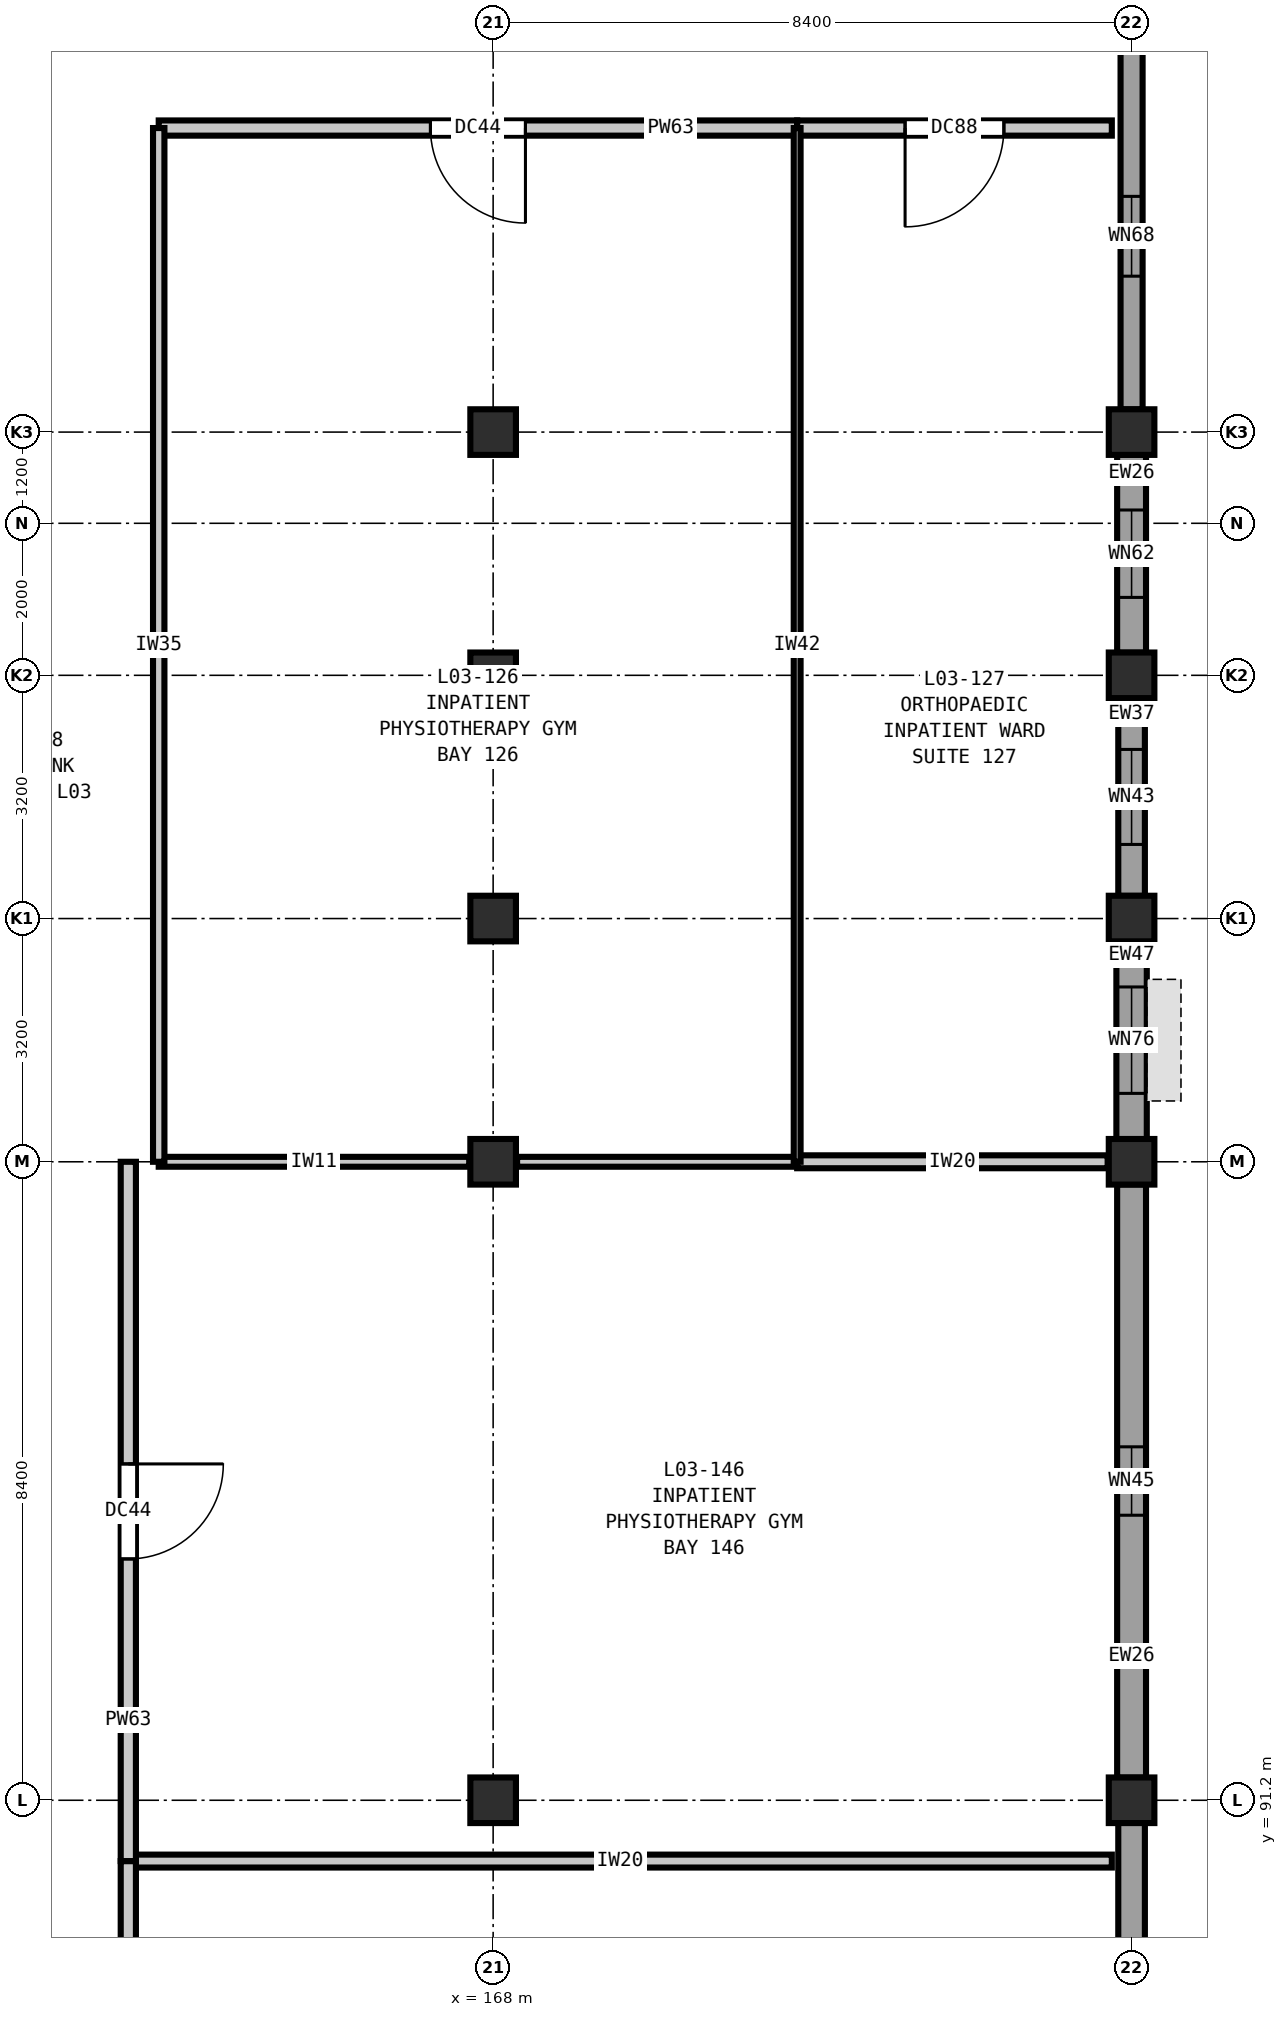
"""IFC4 building model, lengths in metres.
Left out: names, types, materials, properties, quantities, classifications, styles, units other than length and angle.
Written with IfcOpenShell. Run it as: python <this file> out.ifc"""

import sys

from ifc_helpers import new_model, si_unit, direction, frame, frame_2d, origin, origin_2d, place, context, subcontext, project, spatial, rectangle, extrude, element, fill, save


model = new_model("IFC4")
c1 = context("Model", 3, precision=1e-05, world=origin(), true_north=direction((0.0, 1.0)))
c2 = subcontext(c1, "Body", "Model", "MODEL_VIEW")
j1 = project(units=[si_unit("LENGTHUNIT", "METRE"), si_unit("PLANEANGLEUNIT", "RADIAN")], contexts=[c1])
p1 = place(None, origin())
s1 = spatial("IfcSite", under=j1, at=p1, CompositionType="ELEMENT")
p2 = place(p1, origin())
s2 = spatial("IfcBuilding", under=s1, at=p2, CompositionType="ELEMENT")
p3 = place(p2, frame((0.0, 0.0, 16.2)))
s3 = spatial("IfcBuildingStorey", under=s2, at=p3, CompositionType="ELEMENT", Elevation=16.2)
for number, where, z_axis, x_axis in (
    (1, (168.0, 91.2, 0.0), (0.0, 0.0, 1.0), (1.0, 0.0, 0.0)),
    (2, (168.0, 99.6, 0.0), (0.0, 0.0, 1.0), (1.0, 0.0, 0.0)),
    (3, (168.0, 102.8, 0.0), (0.0, 0.0, 1.0), (1.0, 0.0, 0.0)),
    (4, (168.0, 106.0, 0.0), (0.0, 0.0, 1.0), (1.0, 0.0, 0.0)),
    (5, (168.0, 109.2, 0.0), (0.0, 0.0, 1.0), (1.0, 0.0, 0.0)),
    (6, (176.4, 91.2, 0.0), (0.0, 0.0, 1.0), (1.0, 0.0, 0.0)),
    (7, (176.4, 99.6, 0.0), (0.0, 0.0, 1.0), (1.0, 0.0, 0.0)),
    (8, (176.4, 102.8, 0.0), (0.0, 0.0, 1.0), (1.0, 0.0, 0.0)),
    (9, (176.4, 106.0, 0.0), (0.0, 0.0, 1.0), (1.0, 0.0, 0.0)),
    (10, (176.4, 109.2, 0.0), (0.0, 0.0, 1.0), (1.0, 0.0, 0.0)),
):
    element("IfcColumn", number, at=place(p3, frame(where, z_axis=z_axis, x_axis=x_axis)), inside=s3, PredefinedType="COLUMN", context=c2, shape_type="SweptSolid", body=[
        extrude(rectangle(XDim=0.6, YDim=0.6, at=origin_2d()), origin(), (0.0, 0.0, 1.0), 4.2),
    ])
p4 = place(p3, frame((176.4, 116.102, 0.0), z_axis=(0.0, 0.0, 1.0), x_axis=(0.0, -1.0, 0.0)))
e11 = element("IfcWall", 11, at=p4, inside=s3, PredefinedType="SOLIDWALL", context=c2, shape_type="SweptSolid", body=[
    extrude(rectangle(XDim=6.604, YDim=0.29, at=frame_2d((3.302, 0.0))), origin(), (0.0, 0.0, 1.0), 3.48),
])
p5 = place(p4, frame((3.801, 0.0, 0.9)))
e12 = element("IfcOpeningElement", 12, at=p5, cuts=e11, PredefinedType="OPENING", context=c2, shape_type="SweptSolid", body=[
    extrude(rectangle(XDim=1.05, YDim=1.4, at=frame_2d((0.525, 0.7))), frame((0.0, 0.155, 0.0), z_axis=(0.0, -1.0, 0.0), x_axis=(1.0, 0.0, 0.0)), (0.0, 0.0, 1.0), 0.31),
])
p6 = place(p3, frame((176.4, 108.902, 0.0), z_axis=(0.0, 0.0, 1.0), x_axis=(0.0, -1.0, 0.0)))
e13 = element("IfcWall", 13, at=p6, inside=s3, PredefinedType="SOLIDWALL", context=c2, shape_type="SweptSolid", body=[
    extrude(rectangle(XDim=2.604, YDim=0.38, at=frame_2d((1.302, 0.0))), origin(), (0.0, 0.0, 1.0), 3.48),
])
p7 = place(p6, frame((0.727, 0.0, 0.9)))
e14 = element("IfcOpeningElement", 14, at=p7, cuts=e13, PredefinedType="OPENING", context=c2, shape_type="SweptSolid", body=[
    extrude(rectangle(XDim=1.15, YDim=1.4, at=frame_2d((0.575, 0.7))), frame((0.0, 0.2, 0.0), z_axis=(0.0, -1.0, 0.0), x_axis=(1.0, 0.0, 0.0)), (0.0, 0.0, 1.0), 0.4),
])
p8 = place(p3, frame((176.4, 105.702, 0.0), z_axis=(0.0, 0.0, 1.0), x_axis=(0.0, -1.0, 0.0)))
e15 = element("IfcWall", 15, at=p8, inside=s3, PredefinedType="SOLIDWALL", context=c2, shape_type="SweptSolid", body=[
    extrude(rectangle(XDim=2.604, YDim=0.35, at=frame_2d((1.302, 0.0))), origin(), (0.0, 0.0, 1.0), 3.48),
])
p9 = place(p8, frame((0.677, 0.0, 0.9)))
e16 = element("IfcOpeningElement", 16, at=p9, cuts=e15, PredefinedType="OPENING", context=c2, shape_type="SweptSolid", body=[
    extrude(rectangle(XDim=1.25, YDim=1.4, at=frame_2d((0.625, 0.7))), frame((0.0, 0.185, 0.0), z_axis=(0.0, -1.0, 0.0), x_axis=(1.0, 0.0, 0.0)), (0.0, 0.0, 1.0), 0.37),
])
p10 = place(p3, frame((176.4, 102.502, 0.0), z_axis=(0.0, 0.0, 1.0), x_axis=(0.0, -1.0, 0.0)))
e17 = element("IfcWall", 17, at=p10, inside=s3, PredefinedType="SOLIDWALL", context=c2, shape_type="SweptSolid", body=[
    extrude(rectangle(XDim=2.604, YDim=0.4, at=frame_2d((1.302, 0.0))), origin(), (0.0, 0.0, 1.0), 3.48),
])
p11 = place(p10, frame((0.602, 0.0, 0.9)))
e18 = element("IfcOpeningElement", 18, at=p11, cuts=e17, PredefinedType="OPENING", context=c2, shape_type="SweptSolid", body=[
    extrude(rectangle(XDim=1.4, YDim=1.4, at=frame_2d((0.7, 0.7))), frame((0.0, 0.21, 0.0), z_axis=(0.0, -1.0, 0.0), x_axis=(1.0, 0.0, 0.0)), (0.0, 0.0, 1.0), 0.42),
])
p12 = place(p3, frame((176.4, 99.302, 0.0), z_axis=(0.0, 0.0, 1.0), x_axis=(0.0, -1.0, 0.0)))
e19 = element("IfcWall", 19, at=p12, inside=s3, PredefinedType="SOLIDWALL", context=c2, shape_type="SweptSolid", body=[
    extrude(rectangle(XDim=7.804, YDim=0.38, at=frame_2d((3.902, 0.0))), origin(), (0.0, 0.0, 1.0), 3.48),
])
p13 = place(p12, frame((3.452, 0.0, 0.9)))
e20 = element("IfcOpeningElement", 20, at=p13, cuts=e19, PredefinedType="OPENING", context=c2, shape_type="SweptSolid", body=[
    extrude(rectangle(XDim=0.9, YDim=1.55, at=frame_2d((0.45, 0.775))), frame((0.0, 0.2, 0.0), z_axis=(0.0, -1.0, 0.0), x_axis=(1.0, 0.0, 0.0)), (0.0, 0.0, 1.0), 0.4),
])
p14 = place(p3, frame((176.4, 90.902, 0.0), z_axis=(0.0, 0.0, 1.0), x_axis=(0.0, -1.0, 0.0)))
e21 = element("IfcWall", 21, at=p14, inside=s3, PredefinedType="SOLIDWALL", context=c2, shape_type="SweptSolid", body=[
    extrude(rectangle(XDim=7.829, YDim=0.35, at=frame_2d((3.915, 0.0))), origin(), (0.0, 0.0, 1.0), 3.48),
])
p15 = place(p14, frame((3.415, 0.0, 0.9)))
e22 = element("IfcOpeningElement", 22, at=p15, cuts=e21, PredefinedType="OPENING", context=c2, shape_type="SweptSolid", body=[
    extrude(rectangle(XDim=1.0, YDim=1.55, at=frame_2d((0.5, 0.775))), frame((0.0, 0.185, 0.0), z_axis=(0.0, -1.0, 0.0), x_axis=(1.0, 0.0, 0.0)), (0.0, 0.0, 1.0), 0.37),
])
p16 = place(p3, frame((163.2, 90.4, 0.0), z_axis=(0.0, 0.0, 1.0), x_axis=(1.0, 0.0, 0.0)))
e23 = element("IfcWall", 23, at=p16, inside=s3, PredefinedType="PARTITIONING", context=c2, shape_type="SweptSolid", body=[
    extrude(rectangle(XDim=12.94, YDim=0.17, at=frame_2d((6.47, 0.0))), origin(), (0.0, 0.0, 1.0), 3.89),
])
p17 = place(p3, frame((163.6, 99.6, 0.0), z_axis=(0.0, 0.0, 1.0), x_axis=(1.0, 0.0, 0.0)))
e24 = element("IfcWall", 24, at=p17, inside=s3, PredefinedType="PARTITIONING", context=c2, shape_type="SweptSolid", body=[
    extrude(rectangle(XDim=4.085, YDim=0.13, at=frame_2d((2.042, 0.0))), origin(), (0.0, 0.0, 1.0), 3.535),
])
p18 = place(p3, frame((168.315, 99.6, 0.0), z_axis=(0.0, 0.0, 1.0), x_axis=(1.0, 0.0, 0.0)))
e25 = element("IfcWall", 25, at=p18, inside=s3, PredefinedType="PARTITIONING", context=c2, shape_type="SweptSolid", body=[
    extrude(rectangle(XDim=3.685, YDim=0.13, at=frame_2d((1.843, 0.0))), origin(), (0.0, 0.0, 1.0), 3.535),
])
p19 = place(p3, frame((172.0, 99.6, 0.0), z_axis=(0.0, 0.0, 1.0), x_axis=(1.0, 0.0, 0.0)))
e26 = element("IfcWall", 26, at=p19, inside=s3, PredefinedType="PARTITIONING", context=c2, shape_type="SweptSolid", body=[
    extrude(rectangle(XDim=4.085, YDim=0.17, at=frame_2d((2.042, 0.0))), origin(), (0.0, 0.0, 1.0), 3.535),
])
p20 = place(p3, frame((163.6, 113.2, 0.0), z_axis=(0.0, 0.0, 1.0), x_axis=(1.0, 0.0, 0.0)))
e27 = element("IfcWall", 27, at=p20, inside=s3, PredefinedType="PARTITIONING", context=c2, shape_type="SweptSolid", body=[
    extrude(rectangle(XDim=8.4, YDim=0.2, at=frame_2d((4.2, 0.0))), origin(), (0.0, 0.0, 1.0), 3.89),
])
p21 = place(p20, frame((3.575, 0.0, 0.0)))
e28 = element("IfcOpeningElement", 28, at=p21, cuts=e27, PredefinedType="OPENING", context=c2, shape_type="SweptSolid", body=[
    extrude(rectangle(XDim=1.25, YDim=2.15, at=frame_2d((0.625, 1.075))), frame((0.0, 0.11, 0.0), z_axis=(0.0, -1.0, 0.0), x_axis=(1.0, 0.0, 0.0)), (0.0, 0.0, 1.0), 0.22),
])
p22 = place(p3, frame((172.0, 113.2, 0.0), z_axis=(0.0, 0.0, 1.0), x_axis=(1.0, 0.0, 0.0)))
e29 = element("IfcWall", 29, at=p22, inside=s3, PredefinedType="PARTITIONING", context=c2, shape_type="SweptSolid", body=[
    extrude(rectangle(XDim=4.14, YDim=0.2, at=frame_2d((2.07, 0.0))), origin(), (0.0, 0.0, 1.0), 3.89),
])
p23 = place(p22, frame((1.42, 0.0, 0.0)))
e30 = element("IfcOpeningElement", 30, at=p23, cuts=e29, PredefinedType="OPENING", context=c2, shape_type="SweptSolid", body=[
    extrude(rectangle(XDim=1.3, YDim=2.2, at=frame_2d((0.65, 1.1))), frame((0.0, 0.11, 0.0), z_axis=(0.0, -1.0, 0.0), x_axis=(1.0, 0.0, 0.0)), (0.0, 0.0, 1.0), 0.22),
])
p24 = place(p3, frame((163.2, 82.8, 0.0), z_axis=(0.0, 0.0, 1.0), x_axis=(0.0, 1.0, 0.0)))
e31 = element("IfcWall", 31, at=p24, inside=s3, PredefinedType="PARTITIONING", context=c2, shape_type="SweptSolid", body=[
    extrude(rectangle(XDim=7.6, YDim=0.2, at=frame_2d((3.8, 0.0))), origin(), (0.0, 0.0, 1.0), 3.89),
])
p25 = place(p24, frame((2.875, 0.0, 0.0)))
e32 = element("IfcOpeningElement", 32, at=p25, cuts=e31, PredefinedType="OPENING", context=c2, shape_type="SweptSolid", body=[
    extrude(rectangle(XDim=1.85, YDim=2.3, at=frame_2d((0.925, 1.15))), frame((0.0, 0.11, 0.0), z_axis=(0.0, -1.0, 0.0), x_axis=(1.0, 0.0, 0.0)), (0.0, 0.0, 1.0), 0.22),
])
p26 = place(p3, frame((163.2, 90.4, 0.0), z_axis=(0.0, 0.0, 1.0), x_axis=(0.0, 1.0, 0.0)))
e33 = element("IfcWall", 33, at=p26, inside=s3, PredefinedType="PARTITIONING", context=c2, shape_type="SweptSolid", body=[
    extrude(rectangle(XDim=9.2, YDim=0.2, at=frame_2d((4.6, 0.0))), origin(), (0.0, 0.0, 1.0), 3.89),
])
p27 = place(p26, frame((3.975, 0.0, 0.0)))
e34 = element("IfcOpeningElement", 34, at=p27, cuts=e33, PredefinedType="OPENING", context=c2, shape_type="SweptSolid", body=[
    extrude(rectangle(XDim=1.25, YDim=2.15, at=frame_2d((0.625, 1.075))), frame((0.0, 0.11, 0.0), z_axis=(0.0, -1.0, 0.0), x_axis=(1.0, 0.0, 0.0)), (0.0, 0.0, 1.0), 0.22),
])
p28 = place(p3, frame((163.6, 99.6, 0.0), z_axis=(0.0, 0.0, 1.0), x_axis=(0.0, 1.0, 0.0)))
e35 = element("IfcWall", 35, at=p28, inside=s3, PredefinedType="PARTITIONING", context=c2, shape_type="SweptSolid", body=[
    extrude(rectangle(XDim=13.6, YDim=0.15, at=frame_2d((6.8, 0.0))), origin(), (0.0, 0.0, 1.0), 3.89),
])
p29 = place(p3, frame((172.0, 99.6, 0.0), z_axis=(0.0, 0.0, 1.0), x_axis=(0.0, 1.0, 0.0)))
e36 = element("IfcWall", 36, at=p29, inside=s3, PredefinedType="PARTITIONING", context=c2, shape_type="SweptSolid", body=[
    extrude(rectangle(XDim=13.6, YDim=0.09, at=frame_2d((6.8, 0.0))), origin(), (0.0, 0.0, 1.0), 3.89),
])
p30 = place(p5, origin())
e37 = element("IfcWindow", 37, at=p30, inside=s3, PartitioningType="SINGLE_PANEL", PredefinedType="WINDOW", context=c2, shape_type="SweptSolid", body=[
    extrude(rectangle(XDim=1.05, YDim=1.4, at=frame_2d((0.525, 0.7))), frame((0.0, 0.03, 0.0), z_axis=(0.0, -1.0, 0.0), x_axis=(1.0, 0.0, 0.0)), (0.0, 0.0, 1.0), 0.06),
])
fill(e12, e37)
p31 = place(p7, origin())
e38 = element("IfcWindow", 38, at=p31, inside=s3, PartitioningType="SINGLE_PANEL", PredefinedType="WINDOW", context=c2, shape_type="SweptSolid", body=[
    extrude(rectangle(XDim=1.15, YDim=1.4, at=frame_2d((0.575, 0.7))), frame((0.0, 0.03, 0.0), z_axis=(0.0, -1.0, 0.0), x_axis=(1.0, 0.0, 0.0)), (0.0, 0.0, 1.0), 0.06),
])
fill(e14, e38)
p32 = place(p9, origin())
e39 = element("IfcWindow", 39, at=p32, inside=s3, PartitioningType="SINGLE_PANEL", PredefinedType="WINDOW", context=c2, shape_type="SweptSolid", body=[
    extrude(rectangle(XDim=1.25, YDim=1.4, at=frame_2d((0.625, 0.7))), frame((0.0, 0.03, 0.0), z_axis=(0.0, -1.0, 0.0), x_axis=(1.0, 0.0, 0.0)), (0.0, 0.0, 1.0), 0.06),
])
fill(e16, e39)
p33 = place(p11, origin())
e40 = element("IfcWindow", 40, at=p33, inside=s3, PartitioningType="SINGLE_PANEL", PredefinedType="WINDOW", context=c2, shape_type="SweptSolid", body=[
    extrude(rectangle(XDim=1.4, YDim=1.4, at=frame_2d((0.7, 0.7))), frame((0.0, 0.03, 0.0), z_axis=(0.0, -1.0, 0.0), x_axis=(1.0, 0.0, 0.0)), (0.0, 0.0, 1.0), 0.06),
])
fill(e18, e40)
p34 = place(p13, origin())
e41 = element("IfcWindow", 41, at=p34, inside=s3, PartitioningType="SINGLE_PANEL", PredefinedType="WINDOW", context=c2, shape_type="SweptSolid", body=[
    extrude(rectangle(XDim=0.9, YDim=1.55, at=frame_2d((0.45, 0.775))), frame((0.0, 0.03, 0.0), z_axis=(0.0, -1.0, 0.0), x_axis=(1.0, 0.0, 0.0)), (0.0, 0.0, 1.0), 0.06),
])
fill(e20, e41)
p35 = place(p21, frame((1.25, 0.0, 0.0), z_axis=(0.0, 0.0, 1.0), x_axis=(-1.0, 0.0, 0.0)))
e42 = element("IfcDoor", 42, at=p35, inside=s3, OperationType="SINGLE_SWING_LEFT", PredefinedType="DOOR", context=c2, shape_type="SweptSolid", body=[
    extrude(rectangle(XDim=1.25, YDim=2.15, at=frame_2d((0.625, 1.075))), frame((0.0, 0.025, 0.0), z_axis=(0.0, -1.0, 0.0), x_axis=(1.0, 0.0, 0.0)), (0.0, 0.0, 1.0), 0.05),
])
fill(e28, e42)
p36 = place(p23, frame((1.3, 0.0, 0.0), z_axis=(0.0, 0.0, 1.0), x_axis=(-1.0, 0.0, 0.0)))
e43 = element("IfcDoor", 43, at=p36, inside=s3, OperationType="SINGLE_SWING_RIGHT", PredefinedType="DOOR", context=c2, shape_type="SweptSolid", body=[
    extrude(rectangle(XDim=1.3, YDim=2.2, at=frame_2d((0.65, 1.1))), frame((0.0, 0.025, 0.0), z_axis=(0.0, -1.0, 0.0), x_axis=(1.0, 0.0, 0.0)), (0.0, 0.0, 1.0), 0.05),
])
fill(e30, e43)
p37 = place(p27, frame((1.25, 0.0, 0.0), z_axis=(0.0, 0.0, 1.0), x_axis=(-1.0, 0.0, 0.0)))
e44 = element("IfcDoor", 44, at=p37, inside=s3, OperationType="SINGLE_SWING_LEFT", PredefinedType="DOOR", context=c2, shape_type="SweptSolid", body=[
    extrude(rectangle(XDim=1.25, YDim=2.15, at=frame_2d((0.625, 1.075))), frame((0.0, 0.025, 0.0), z_axis=(0.0, -1.0, 0.0), x_axis=(1.0, 0.0, 0.0)), (0.0, 0.0, 1.0), 0.05),
])
fill(e34, e44)
save(model, sys.argv[1])
